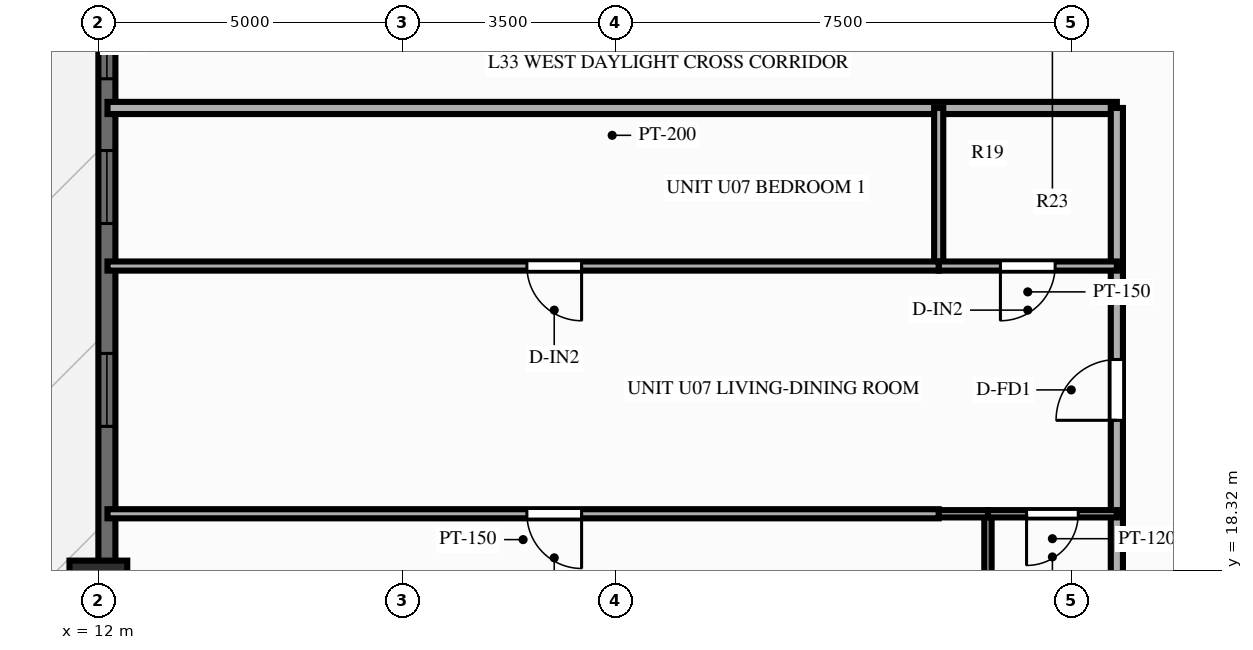
"""IFC4 building model, lengths in metres.
Left out: names, types, materials, properties, quantities, classifications, styles, units other than length and angle.
Written with IfcOpenShell. Run it as: python <this file> out.ifc"""

import sys

from ifc_helpers import new_model, si_unit, direction, frame, frame_2d, origin, origin_2d, place, context, subcontext, project, spatial, rectangle, extrude, source, transform, mapped, element, fill, save


model = new_model("IFC4")
c1 = context("Model", 3, precision=1e-05, world=origin(), true_north=direction((0.0, 1.0)))
c2 = subcontext(c1, "Body", "Model", "MODEL_VIEW")
j1 = project(units=[si_unit("LENGTHUNIT", "METRE"), si_unit("PLANEANGLEUNIT", "RADIAN")], contexts=[c1])
p1 = place(None, origin())
s1 = spatial("IfcSite", under=j1, at=p1, CompositionType="ELEMENT")
p2 = place(p1, origin())
s2 = spatial("IfcBuilding", under=s1, at=p2, CompositionType="ELEMENT")
p3 = place(p2, frame((0.0, 0.0, 104.85)))
s3 = spatial("IfcBuildingStorey", under=s2, at=p3, CompositionType="ELEMENT", Elevation=104.85)
m1 = source(origin(), c2, "Body", "SweptSolid", [
    extrude(rectangle(XDim=0.95, YDim=0.95, at=origin_2d()), origin(), (0.0, 0.0, 1.0), 3.0),
])
p4 = place(p3, frame((12.0, 18.0, 0.0), z_axis=(0.0, 0.0, 1.0), x_axis=(1.0, 0.0, 0.0)))
e1 = element("IfcColumn", 1, at=p4, inside=s3, PredefinedType="COLUMN", context=c2, shape_type="MappedRepresentation", body=[
    mapped(m1, transform((0.0, 0.0, 0.0), scale=1.0)),
])
p5 = place(p3, frame((12.14, 7.2, 0.0), z_axis=(0.0, 0.0, 1.0), x_axis=(0.0, 1.0, 0.0)))
e2 = element("IfcWall", 2, at=p5, inside=s3, PredefinedType="SOLIDWALL", context=c2, shape_type="SweptSolid", body=[
    extrude(rectangle(XDim=39.6, YDim=0.28, at=frame_2d((19.8, 0.0))), origin(), (0.0, 0.0, 1.0), 2.28),
])
p6 = place(p5, frame((0.945, 0.0, 0.25)))
e3 = element("IfcOpeningElement", 3, at=p6, cuts=e2, PredefinedType="OPENING", context=c2, shape_type="SweptSolid", body=[
    extrude(rectangle(XDim=1.2, YDim=1.5, at=frame_2d((0.6, 0.75))), frame((0.0, 0.152, 0.0), z_axis=(0.0, -1.0, 0.0), x_axis=(1.0, 0.0, 0.0)), (0.0, 0.0, 1.0), 0.304),
])
p7 = place(p5, frame((4.213, 0.0, 0.25)))
e4 = element("IfcOpeningElement", 4, at=p7, cuts=e2, PredefinedType="OPENING", context=c2, shape_type="SweptSolid", body=[
    extrude(rectangle(XDim=1.2, YDim=1.5, at=frame_2d((0.6, 0.75))), frame((0.0, 0.152, 0.0), z_axis=(0.0, -1.0, 0.0), x_axis=(1.0, 0.0, 0.0)), (0.0, 0.0, 1.0), 0.304),
])
p8 = place(p5, frame((7.55, 0.0, 0.25)))
e5 = element("IfcOpeningElement", 5, at=p8, cuts=e2, PredefinedType="OPENING", context=c2, shape_type="SweptSolid", body=[
    extrude(rectangle(XDim=1.2, YDim=1.5, at=frame_2d((0.6, 0.75))), frame((0.0, 0.152, 0.0), z_axis=(0.0, -1.0, 0.0), x_axis=(1.0, 0.0, 0.0)), (0.0, 0.0, 1.0), 0.304),
])
p9 = place(p5, frame((13.483, 0.0, 0.25)))
e6 = element("IfcOpeningElement", 6, at=p9, cuts=e2, PredefinedType="OPENING", context=c2, shape_type="SweptSolid", body=[
    extrude(rectangle(XDim=1.2, YDim=1.5, at=frame_2d((0.6, 0.75))), frame((0.0, 0.152, 0.0), z_axis=(0.0, -1.0, 0.0), x_axis=(1.0, 0.0, 0.0)), (0.0, 0.0, 1.0), 0.304),
])
p10 = place(p5, frame((16.82, 0.0, 0.25)))
e7 = element("IfcOpeningElement", 7, at=p10, cuts=e2, PredefinedType="OPENING", context=c2, shape_type="SweptSolid", body=[
    extrude(rectangle(XDim=1.2, YDim=1.5, at=frame_2d((0.6, 0.75))), frame((0.0, 0.152, 0.0), z_axis=(0.0, -1.0, 0.0), x_axis=(1.0, 0.0, 0.0)), (0.0, 0.0, 1.0), 0.304),
])
p11 = place(p5, frame((19.2, 0.0, 0.25)))
e8 = element("IfcOpeningElement", 8, at=p11, cuts=e2, PredefinedType="OPENING", context=c2, shape_type="SweptSolid", body=[
    extrude(rectangle(XDim=1.2, YDim=1.5, at=frame_2d((0.6, 0.75))), frame((0.0, 0.152, 0.0), z_axis=(0.0, -1.0, 0.0), x_axis=(1.0, 0.0, 0.0)), (0.0, 0.0, 1.0), 0.304),
])
p12 = place(p5, frame((21.578, 0.0, 0.25)))
e9 = element("IfcOpeningElement", 9, at=p12, cuts=e2, PredefinedType="OPENING", context=c2, shape_type="SweptSolid", body=[
    extrude(rectangle(XDim=1.2, YDim=1.5, at=frame_2d((0.6, 0.75))), frame((0.0, 0.152, 0.0), z_axis=(0.0, -1.0, 0.0), x_axis=(1.0, 0.0, 0.0)), (0.0, 0.0, 1.0), 0.304),
])
p13 = place(p5, frame((24.713, 0.0, 0.0)))
e10 = element("IfcOpeningElement", 10, at=p13, cuts=e2, PredefinedType="OPENING", context=c2, shape_type="SweptSolid", body=[
    extrude(rectangle(XDim=1.6, YDim=2.15, at=frame_2d((0.8, 1.075))), frame((0.0, 0.152, 0.0), z_axis=(0.0, -1.0, 0.0), x_axis=(1.0, 0.0, 0.0)), (0.0, 0.0, 1.0), 0.304),
])
p14 = place(p5, frame((29.305, 0.0, 0.25)))
e11 = element("IfcOpeningElement", 11, at=p14, cuts=e2, PredefinedType="OPENING", context=c2, shape_type="SweptSolid", body=[
    extrude(rectangle(XDim=0.7, YDim=1.5, at=frame_2d((0.35, 0.75))), frame((0.0, 0.152, 0.0), z_axis=(0.0, -1.0, 0.0), x_axis=(1.0, 0.0, 0.0)), (0.0, 0.0, 1.0), 0.304),
])
p15 = place(p5, frame((30.848, 0.0, 0.25)))
e12 = element("IfcOpeningElement", 12, at=p15, cuts=e2, PredefinedType="OPENING", context=c2, shape_type="SweptSolid", body=[
    extrude(rectangle(XDim=1.2, YDim=1.5, at=frame_2d((0.6, 0.75))), frame((0.0, 0.152, 0.0), z_axis=(0.0, -1.0, 0.0), x_axis=(1.0, 0.0, 0.0)), (0.0, 0.0, 1.0), 0.304),
])
p16 = place(p5, frame((34.183, 0.0, 0.25)))
e13 = element("IfcOpeningElement", 13, at=p16, cuts=e2, PredefinedType="OPENING", context=c2, shape_type="SweptSolid", body=[
    extrude(rectangle(XDim=1.2, YDim=1.5, at=frame_2d((0.6, 0.75))), frame((0.0, 0.152, 0.0), z_axis=(0.0, -1.0, 0.0), x_axis=(1.0, 0.0, 0.0)), (0.0, 0.0, 1.0), 0.304),
])
p17 = place(p5, frame((37.452, 0.0, 0.25)))
e14 = element("IfcOpeningElement", 14, at=p17, cuts=e2, PredefinedType="OPENING", context=c2, shape_type="SweptSolid", body=[
    extrude(rectangle(XDim=1.2, YDim=1.5, at=frame_2d((0.6, 0.75))), frame((0.0, 0.152, 0.0), z_axis=(0.0, -1.0, 0.0), x_axis=(1.0, 0.0, 0.0)), (0.0, 0.0, 1.0), 0.304),
])
p18 = place(p3, frame((28.75, 25.92, 0.0), z_axis=(0.0, 0.0, 1.0), x_axis=(-1.0, 0.0, 0.0)))
e15 = element("IfcWall", 15, at=p18, inside=s3, PredefinedType="PARTITIONING", context=c2, shape_type="SweptSolid", body=[
    extrude(rectangle(XDim=16.6, YDim=0.2, at=frame_2d((8.3, 0.0))), origin(), (0.0, 0.0, 1.0), 2.79),
])
p19 = place(p3, frame((28.75, 16.65, 0.0), z_axis=(0.0, 0.0, 1.0), x_axis=(0.0, 1.0, 0.0)))
e16 = element("IfcWall", 16, at=p19, inside=s3, PredefinedType="PARTITIONING", context=c2, shape_type="SweptSolid", body=[
    extrude(rectangle(XDim=2.596, YDim=0.2, at=frame_2d((1.298, 0.0))), origin(), (0.0, 0.0, 1.0), 2.79),
])
p20 = place(p3, frame((28.75, 19.246, 0.0), z_axis=(0.0, 0.0, 1.0), x_axis=(0.0, 1.0, 0.0)))
e17 = element("IfcWall", 17, at=p20, inside=s3, PredefinedType="PARTITIONING", context=c2, shape_type="SweptSolid", body=[
    extrude(rectangle(XDim=4.074, YDim=0.2, at=frame_2d((2.037, 0.0))), origin(), (0.0, 0.0, 1.0), 2.79),
])
p21 = place(p20, frame((1.537, 0.0, 0.0)))
e18 = element("IfcOpeningElement", 18, at=p21, cuts=e17, PredefinedType="OPENING", context=c2, shape_type="SweptSolid", body=[
    extrude(rectangle(XDim=1.0, YDim=2.15, at=frame_2d((0.5, 1.075))), frame((0.0, 0.112, 0.0), z_axis=(0.0, -1.0, 0.0), x_axis=(1.0, 0.0, 0.0)), (0.0, 0.0, 1.0), 0.224),
])
p22 = place(p3, frame((28.75, 23.32, 0.0), z_axis=(0.0, 0.0, 1.0), x_axis=(0.0, 1.0, 0.0)))
e19 = element("IfcWall", 19, at=p22, inside=s3, PredefinedType="PARTITIONING", context=c2, shape_type="SweptSolid", body=[
    extrude(rectangle(XDim=2.6, YDim=0.2, at=frame_2d((1.3, 0.0))), origin(), (0.0, 0.0, 1.0), 2.79),
])
p23 = place(p3, frame((26.63, 16.65, 0.0), z_axis=(0.0, 0.0, 1.0), x_axis=(0.0, 1.0, 0.0)))
e20 = element("IfcWall", 20, at=p23, inside=s3, PredefinedType="PARTITIONING", context=c2, shape_type="SweptSolid", body=[
    extrude(rectangle(XDim=2.596, YDim=0.12, at=frame_2d((1.298, 0.0))), origin(), (0.0, 0.0, 1.0), 2.79),
])
p24 = place(p3, frame((25.82, 23.32, 0.0), z_axis=(0.0, 0.0, 1.0), x_axis=(0.0, 1.0, 0.0)))
e21 = element("IfcWall", 21, at=p24, inside=s3, PredefinedType="PARTITIONING", context=c2, shape_type="SweptSolid", body=[
    extrude(rectangle(XDim=2.6, YDim=0.15, at=frame_2d((1.3, 0.0))), origin(), (0.0, 0.0, 1.0), 2.79),
])
p25 = place(p3, frame((28.75, 19.246, 0.0), z_axis=(0.0, 0.0, 1.0), x_axis=(-1.0, 0.0, 0.0)))
e22 = element("IfcWall", 22, at=p25, inside=s3, PredefinedType="PARTITIONING", context=c2, shape_type="SweptSolid", body=[
    extrude(rectangle(XDim=2.12, YDim=0.12, at=frame_2d((1.06, 0.0))), origin(), (0.0, 0.0, 1.0), 2.79),
])
p26 = place(p25, frame((0.635, 0.0, 0.0)))
e23 = element("IfcOpeningElement", 23, at=p26, cuts=e22, PredefinedType="OPENING", context=c2, shape_type="SweptSolid", body=[
    extrude(rectangle(XDim=0.85, YDim=2.05, at=frame_2d((0.425, 1.025))), frame((0.0, 0.072, 0.0), z_axis=(0.0, -1.0, 0.0), x_axis=(1.0, 0.0, 0.0)), (0.0, 0.0, 1.0), 0.144),
])
p27 = place(p3, frame((26.63, 19.246, 0.0), z_axis=(0.0, 0.0, 1.0), x_axis=(-1.0, 0.0, 0.0)))
e24 = element("IfcWall", 24, at=p27, inside=s3, PredefinedType="PARTITIONING", context=c2, shape_type="SweptSolid", body=[
    extrude(rectangle(XDim=0.81, YDim=0.12, at=frame_2d((0.405, 0.0))), origin(), (0.0, 0.0, 1.0), 2.79),
])
p28 = place(p3, frame((25.82, 19.246, 0.0), z_axis=(0.0, 0.0, 1.0), x_axis=(-1.0, 0.0, 0.0)))
e25 = element("IfcWall", 25, at=p28, inside=s3, PredefinedType="PARTITIONING", context=c2, shape_type="SweptSolid", body=[
    extrude(rectangle(XDim=13.67, YDim=0.15, at=frame_2d((6.835, 0.0))), origin(), (0.0, 0.0, 1.0), 2.79),
])
p29 = place(p28, frame((5.873, 0.0, 0.0)))
e26 = element("IfcOpeningElement", 26, at=p29, cuts=e25, PredefinedType="OPENING", context=c2, shape_type="SweptSolid", body=[
    extrude(rectangle(XDim=0.9, YDim=2.1, at=frame_2d((0.45, 1.05))), frame((0.0, 0.087, 0.0), z_axis=(0.0, -1.0, 0.0), x_axis=(1.0, 0.0, 0.0)), (0.0, 0.0, 1.0), 0.174),
])
p30 = place(p3, frame((28.75, 23.32, 0.0), z_axis=(0.0, 0.0, 1.0), x_axis=(-1.0, 0.0, 0.0)))
e27 = element("IfcWall", 27, at=p30, inside=s3, PredefinedType="PARTITIONING", context=c2, shape_type="SweptSolid", body=[
    extrude(rectangle(XDim=2.93, YDim=0.15, at=frame_2d((1.465, 0.0))), origin(), (0.0, 0.0, 1.0), 2.79),
])
p31 = place(p30, frame((1.015, 0.0, 0.0)))
e28 = element("IfcOpeningElement", 28, at=p31, cuts=e27, PredefinedType="OPENING", context=c2, shape_type="SweptSolid", body=[
    extrude(rectangle(XDim=0.9, YDim=2.1, at=frame_2d((0.45, 1.05))), frame((0.0, 0.087, 0.0), z_axis=(0.0, -1.0, 0.0), x_axis=(1.0, 0.0, 0.0)), (0.0, 0.0, 1.0), 0.174),
])
p32 = place(p3, frame((25.82, 23.32, 0.0), z_axis=(0.0, 0.0, 1.0), x_axis=(-1.0, 0.0, 0.0)))
e29 = element("IfcWall", 29, at=p32, inside=s3, PredefinedType="PARTITIONING", context=c2, shape_type="SweptSolid", body=[
    extrude(rectangle(XDim=13.67, YDim=0.15, at=frame_2d((6.835, 0.0))), origin(), (0.0, 0.0, 1.0), 2.79),
])
p33 = place(p32, frame((5.873, 0.0, 0.0)))
e30 = element("IfcOpeningElement", 30, at=p33, cuts=e29, PredefinedType="OPENING", context=c2, shape_type="SweptSolid", body=[
    extrude(rectangle(XDim=0.9, YDim=2.1, at=frame_2d((0.45, 1.05))), frame((0.0, 0.087, 0.0), z_axis=(0.0, -1.0, 0.0), x_axis=(1.0, 0.0, 0.0)), (0.0, 0.0, 1.0), 0.174),
])
m2 = source(origin(), c2, "Body", "SweptSolid", [
    extrude(rectangle(XDim=1.2, YDim=1.5, at=frame_2d((0.6, 0.75))), frame((0.0, 0.03, 0.0), z_axis=(0.0, -1.0, 0.0), x_axis=(1.0, 0.0, 0.0)), (0.0, 0.0, 1.0), 0.06),
])
p34 = place(p9, origin())
e31 = element("IfcWindow", 31, at=p34, inside=s3, PartitioningType="SINGLE_PANEL", PredefinedType="WINDOW", context=c2, shape_type="MappedRepresentation", body=[
    mapped(m2, transform((0.0, 0.0, 0.0), scale=1.0)),
])
fill(e6, e31)
p35 = place(p10, origin())
e32 = element("IfcWindow", 32, at=p35, inside=s3, PartitioningType="SINGLE_PANEL", PredefinedType="WINDOW", context=c2, shape_type="MappedRepresentation", body=[
    mapped(m2, transform((0.0, 0.0, 0.0), scale=1.0)),
])
fill(e7, e32)
p36 = place(p11, origin())
e33 = element("IfcWindow", 33, at=p36, inside=s3, PartitioningType="SINGLE_PANEL", PredefinedType="WINDOW", context=c2, shape_type="MappedRepresentation", body=[
    mapped(m2, transform((0.0, 0.0, 0.0), scale=1.0)),
])
fill(e8, e33)
m3 = source(origin(), c2, "Body", "SweptSolid", [
    extrude(rectangle(XDim=1.0, YDim=2.15, at=frame_2d((0.5, 1.075))), frame((0.0, 0.025, 0.0), z_axis=(0.0, -1.0, 0.0), x_axis=(1.0, 0.0, 0.0)), (0.0, 0.0, 1.0), 0.05),
])
p37 = place(p21, origin())
e34 = element("IfcDoor", 34, at=p37, inside=s3, OperationType="SINGLE_SWING_LEFT", PredefinedType="DOOR", context=c2, shape_type="MappedRepresentation", body=[
    mapped(m3, transform((0.0, 0.0, 0.0), scale=1.0)),
])
fill(e18, e34)
m4 = source(origin(), c2, "Body", "SweptSolid", [
    extrude(rectangle(XDim=0.85, YDim=2.05, at=frame_2d((0.425, 1.025))), frame((0.0, 0.025, 0.0), z_axis=(0.0, -1.0, 0.0), x_axis=(1.0, 0.0, 0.0)), (0.0, 0.0, 1.0), 0.05),
])
p38 = place(p26, origin())
e35 = element("IfcDoor", 35, at=p38, inside=s3, OperationType="SINGLE_SWING_RIGHT", PredefinedType="DOOR", context=c2, shape_type="MappedRepresentation", body=[
    mapped(m4, transform((0.0, 0.0, 0.0), scale=1.0)),
])
fill(e23, e35)
m5 = source(origin(), c2, "Body", "SweptSolid", [
    extrude(rectangle(XDim=0.9, YDim=2.1, at=frame_2d((0.45, 1.05))), frame((0.0, 0.025, 0.0), z_axis=(0.0, -1.0, 0.0), x_axis=(1.0, 0.0, 0.0)), (0.0, 0.0, 1.0), 0.05),
])
p39 = place(p29, origin())
e36 = element("IfcDoor", 36, at=p39, inside=s3, OperationType="SINGLE_SWING_LEFT", PredefinedType="DOOR", context=c2, shape_type="MappedRepresentation", body=[
    mapped(m5, transform((0.0, 0.0, 0.0), scale=1.0)),
])
fill(e26, e36)
p40 = place(p31, origin())
e37 = element("IfcDoor", 37, at=p40, inside=s3, OperationType="SINGLE_SWING_RIGHT", PredefinedType="DOOR", context=c2, shape_type="MappedRepresentation", body=[
    mapped(m5, transform((0.0, 0.0, 0.0), scale=1.0)),
])
fill(e28, e37)
p41 = place(p33, origin())
e38 = element("IfcDoor", 38, at=p41, inside=s3, OperationType="SINGLE_SWING_LEFT", PredefinedType="DOOR", context=c2, shape_type="MappedRepresentation", body=[
    mapped(m5, transform((0.0, 0.0, 0.0), scale=1.0)),
])
fill(e30, e38)
save(model, sys.argv[1])
